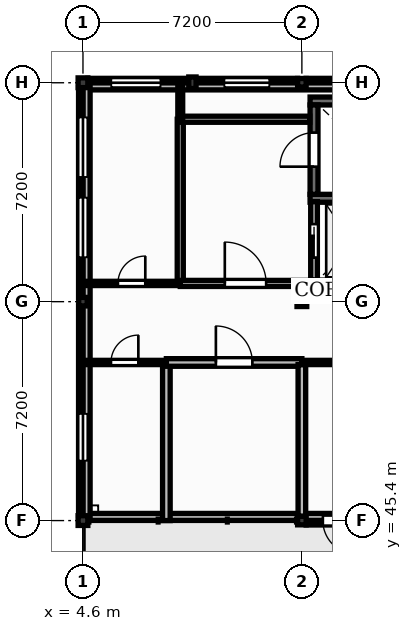
"""IFC4 building model, lengths in metres.
Left out: names, types, materials, properties, quantities, classifications, styles, units other than length and angle.
Written with IfcOpenShell. Run it as: python <this file> out.ifc"""

import sys

from ifc_helpers import new_model, si_unit, direction, frame, frame_2d, origin, origin_2d, place, context, subcontext, project, spatial, polyline, rectangle, outline, extrude, element, fill, save


model = new_model("IFC4")
c1 = context("Model", 3, precision=1e-05, world=origin(), true_north=direction((0.0, 1.0)))
c2 = subcontext(c1, "Body", "Model", "MODEL_VIEW")
j1 = project(units=[si_unit("LENGTHUNIT", "METRE"), si_unit("PLANEANGLEUNIT", "RADIAN")], contexts=[c1])
p1 = place(None, origin())
s1 = spatial("IfcSite", under=j1, at=p1, CompositionType="ELEMENT")
p2 = place(p1, origin())
s2 = spatial("IfcBuilding", under=s1, at=p2, CompositionType="ELEMENT")
p3 = place(p2, frame((0.0, 0.0, 17.4)))
s3 = spatial("IfcBuildingStorey", under=s2, at=p3, CompositionType="ELEMENT", Elevation=17.4)
p4 = place(p3, frame((4.6, 45.4, 0.0), z_axis=(0.0, 0.0, 1.0), x_axis=(1.0, 0.0, 0.0)))
e1 = element("IfcColumn", 1, at=p4, inside=s3, PredefinedType="COLUMN", context=c2, shape_type="SweptSolid", body=[
    extrude(rectangle(XDim=0.32, YDim=0.32, at=origin_2d()), origin(), (0.0, 0.0, 1.0), 3.95),
])
p5 = place(p3, frame((4.6, 52.6, 0.0), z_axis=(0.0, 0.0, 1.0), x_axis=(1.0, 0.0, 0.0)))
e2 = element("IfcColumn", 2, at=p5, inside=s3, PredefinedType="COLUMN", context=c2, shape_type="SweptSolid", body=[
    extrude(rectangle(XDim=0.28, YDim=0.28, at=origin_2d()), origin(), (0.0, 0.0, 1.0), 3.95),
])
p6 = place(p3, frame((4.6, 59.8, 0.0), z_axis=(0.0, 0.0, 1.0), x_axis=(1.0, 0.0, 0.0)))
e3 = element("IfcColumn", 3, at=p6, inside=s3, PredefinedType="COLUMN", context=c2, shape_type="SweptSolid", body=[
    extrude(rectangle(XDim=0.32, YDim=0.32, at=origin_2d()), origin(), (0.0, 0.0, 1.0), 3.95),
])
p7 = place(p3, frame((11.8, 45.4, 0.0), z_axis=(0.0, 0.0, 1.0), x_axis=(1.0, 0.0, 0.0)))
e4 = element("IfcColumn", 4, at=p7, inside=s3, PredefinedType="COLUMN", context=c2, shape_type="SweptSolid", body=[
    extrude(rectangle(XDim=0.28, YDim=0.28, at=origin_2d()), origin(), (0.0, 0.0, 1.0), 3.95),
])
p8 = place(p3, frame((11.8, 52.6, 0.0), z_axis=(0.0, 0.0, 1.0), x_axis=(1.0, 0.0, 0.0)))
e5 = element("IfcColumn", 5, at=p8, inside=s3, PredefinedType="COLUMN", context=c2, shape_type="SweptSolid", body=[
    extrude(rectangle(XDim=0.32, YDim=0.32, at=origin_2d()), origin(), (0.0, 0.0, 1.0), 3.95),
])
p9 = place(p3, frame((11.8, 59.8, 0.0), z_axis=(0.0, 0.0, 1.0), x_axis=(1.0, 0.0, 0.0)))
e6 = element("IfcColumn", 6, at=p9, inside=s3, PredefinedType="COLUMN", context=c2, shape_type="SweptSolid", body=[
    extrude(rectangle(XDim=0.28, YDim=0.28, at=origin_2d()), origin(), (0.0, 0.0, 1.0), 3.95),
])
p10 = place(p3, frame((8.2, 59.8, 0.0), z_axis=(0.0, 0.0, 1.0), x_axis=(1.0, 0.0, 0.0)))
e7 = element("IfcColumn", 7, at=p10, inside=s3, PredefinedType="PILASTER", context=c2, shape_type="SweptSolid", body=[
    extrude(rectangle(XDim=0.24, YDim=0.38, at=origin_2d()), origin(), (0.0, 0.0, 1.0), 3.95),
])
p11 = place(p3, frame((4.6, 45.56, 0.0), z_axis=(0.0, 0.0, 1.0), x_axis=(0.0, 1.0, 0.0)))
e8 = element("IfcWall", 8, at=p11, inside=s3, PredefinedType="SOLIDWALL", context=c2, shape_type="SweptSolid", body=[
    extrude(rectangle(XDim=6.9, YDim=0.29, at=frame_2d((3.45, 0.0))), origin(), (0.0, 0.0, 1.0), 3.49),
])
p12 = place(p11, frame((1.81, 0.0, 1.05)))
e9 = element("IfcOpeningElement", 9, at=p12, cuts=e8, PredefinedType="OPENING", context=c2, shape_type="SweptSolid", body=[
    extrude(rectangle(XDim=1.54, YDim=1.65, at=frame_2d((0.77, 0.825))), frame((0.0, 0.155, 0.0), z_axis=(0.0, -1.0, 0.0), x_axis=(1.0, 0.0, 0.0)), (0.0, 0.0, 1.0), 0.31),
])
p13 = place(p3, frame((4.76, 59.8, 0.0), z_axis=(0.0, 0.0, 1.0), x_axis=(1.0, 0.0, 0.0)))
e10 = element("IfcWall", 10, at=p13, inside=s3, PredefinedType="SOLIDWALL", context=c2, shape_type="SweptSolid", body=[
    extrude(rectangle(XDim=3.32, YDim=0.29, at=frame_2d((1.66, 0.0))), origin(), (0.0, 0.0, 1.0), 3.49),
])
p14 = place(p13, frame((0.77, 0.0, 1.0)))
e11 = element("IfcOpeningElement", 11, at=p14, cuts=e10, PredefinedType="OPENING", context=c2, shape_type="SweptSolid", body=[
    extrude(rectangle(XDim=1.62, YDim=1.95, at=frame_2d((0.81, 0.975))), frame((0.0, 0.155, 0.0), z_axis=(0.0, -1.0, 0.0), x_axis=(1.0, 0.0, 0.0)), (0.0, 0.0, 1.0), 0.31),
])
p15 = place(p3, frame((8.32, 59.8, 0.0), z_axis=(0.0, 0.0, 1.0), x_axis=(1.0, 0.0, 0.0)))
e12 = element("IfcWall", 12, at=p15, inside=s3, PredefinedType="SOLIDWALL", context=c2, shape_type="SweptSolid", body=[
    extrude(rectangle(XDim=3.34, YDim=0.29, at=frame_2d((1.67, 0.0))), origin(), (0.0, 0.0, 1.0), 3.49),
])
p16 = place(p15, frame((0.93, 0.0, 1.0)))
e13 = element("IfcOpeningElement", 13, at=p16, cuts=e12, PredefinedType="OPENING", context=c2, shape_type="SweptSolid", body=[
    extrude(rectangle(XDim=1.48, YDim=1.95, at=frame_2d((0.74, 0.975))), frame((0.0, 0.155, 0.0), z_axis=(0.0, -1.0, 0.0), x_axis=(1.0, 0.0, 0.0)), (0.0, 0.0, 1.0), 0.31),
])
p17 = place(p3, frame((4.6, 52.74, 0.0), z_axis=(0.0, 0.0, 1.0), x_axis=(0.0, 1.0, 0.0)))
e14 = element("IfcWall", 14, at=p17, inside=s3, PredefinedType="SOLIDWALL", context=c2, shape_type="SweptSolid", body=[
    extrude(rectangle(XDim=6.9, YDim=0.29, at=frame_2d((3.45, 0.0))), origin(), (0.0, 0.0, 1.0), 3.49),
])
p18 = place(p17, frame((1.32, 0.0, 1.05)))
e15 = element("IfcOpeningElement", 15, at=p18, cuts=e14, PredefinedType="OPENING", context=c2, shape_type="SweptSolid", body=[
    extrude(rectangle(XDim=1.96, YDim=1.65, at=frame_2d((0.98, 0.825))), frame((0.0, 0.155, 0.0), z_axis=(0.0, -1.0, 0.0), x_axis=(1.0, 0.0, 0.0)), (0.0, 0.0, 1.0), 0.31),
])
p19 = place(p17, frame((3.96, 0.0, 1.05)))
e16 = element("IfcOpeningElement", 16, at=p19, cuts=e14, PredefinedType="OPENING", context=c2, shape_type="SweptSolid", body=[
    extrude(rectangle(XDim=1.96, YDim=1.65, at=frame_2d((0.98, 0.825))), frame((0.0, 0.155, 0.0), z_axis=(0.0, -1.0, 0.0), x_axis=(1.0, 0.0, 0.0)), (0.0, 0.0, 1.0), 0.31),
])
p20 = place(p3, frame((11.94, 45.4, 0.0), z_axis=(0.0, 0.0, 1.0), x_axis=(1.0, 0.0, 0.0)))
e17 = element("IfcWall", 17, at=p20, inside=s3, PredefinedType="SOLIDWALL", context=c2, shape_type="SweptSolid", body=[
    extrude(rectangle(XDim=6.9, YDim=0.29, at=frame_2d((3.45, 0.0))), origin(), (0.0, 0.0, 1.0), 3.49),
])
p21 = place(p20, frame((0.55, 0.0, 0.0)))
e18 = element("IfcOpeningElement", 18, at=p21, cuts=e17, PredefinedType="OPENING", context=c2, shape_type="SweptSolid", body=[
    extrude(rectangle(XDim=1.1, YDim=2.25, at=frame_2d((0.55, 1.125))), frame((0.0, 0.155, 0.0), z_axis=(0.0, -1.0, 0.0), x_axis=(1.0, 0.0, 0.0)), (0.0, 0.0, 1.0), 0.31),
])
p22 = place(p20, frame((2.438, 0.0, 1.5)))
e19 = element("IfcOpeningElement", 19, at=p22, cuts=e17, PredefinedType="OPENING", context=c2, shape_type="SweptSolid", body=[
    extrude(rectangle(XDim=1.15, YDim=1.25, at=frame_2d((0.575, 0.625))), frame((0.0, 0.155, 0.0), z_axis=(0.0, -1.0, 0.0), x_axis=(1.0, 0.0, 0.0)), (0.0, 0.0, 1.0), 0.31),
])
p23 = place(p20, frame((4.948, 0.0, 1.0)))
e20 = element("IfcOpeningElement", 20, at=p23, cuts=e17, PredefinedType="OPENING", context=c2, shape_type="SweptSolid", body=[
    extrude(rectangle(XDim=1.2, YDim=1.95, at=frame_2d((0.6, 0.975))), frame((0.0, 0.155, 0.0), z_axis=(0.0, -1.0, 0.0), x_axis=(1.0, 0.0, 0.0)), (0.0, 0.0, 1.0), 0.31),
])
p24 = place(p3, frame((11.94, 59.8, 0.0), z_axis=(0.0, 0.0, 1.0), x_axis=(1.0, 0.0, 0.0)))
e21 = element("IfcWall", 21, at=p24, inside=s3, PredefinedType="SOLIDWALL", context=c2, shape_type="SweptSolid", body=[
    extrude(rectangle(XDim=6.9, YDim=0.29, at=frame_2d((3.45, 0.0))), origin(), (0.0, 0.0, 1.0), 3.49),
])
p25 = place(p3, frame((4.6, 59.68, 4.2), z_axis=(0.0, 0.0, 1.0), x_axis=(1.0, 0.0, 0.0)))
e22 = element("IfcWall", 22, at=p25, inside=s3, PredefinedType="PARAPET", context=c2, shape_type="SweptSolid", body=[
    extrude(outline(polyline([(0.0, 0.0), (50.4, 0.0), (50.4, 0.65), (39.312, 0.925), (39.312, 0.65), (32.256, 1.2), (32.256, 0.925), (18.144, 1.2), (18.144, 0.925), (11.088, 0.925), (11.088, 0.65), (0.0, 0.65), (0.0, 0.0)])), frame((0.0, 0.115, 0.0), z_axis=(0.0, -1.0, 0.0), x_axis=(1.0, 0.0, 0.0)), (0.0, 0.0, 1.0), 0.23),
])
p26 = place(p3, frame((4.6, 45.52, 4.2), z_axis=(0.0, 0.0, 1.0), x_axis=(1.0, 0.0, 0.0)))
e23 = element("IfcWall", 23, at=p26, inside=s3, PredefinedType="PARAPET", context=c2, shape_type="SweptSolid", body=[
    extrude(outline(polyline([(0.0, 0.0), (50.4, 0.0), (50.4, 0.6), (39.312, 0.85), (39.312, 0.6), (32.256, 1.1), (32.256, 0.85), (18.144, 1.1), (18.144, 0.85), (11.088, 0.85), (11.088, 0.6), (0.0, 0.6), (0.0, 0.0)])), frame((0.0, 0.115, 0.0), z_axis=(0.0, -1.0, 0.0), x_axis=(1.0, 0.0, 0.0)), (0.0, 0.0, 1.0), 0.23),
])
p27 = place(p3, frame((4.72, 45.52, 4.2), z_axis=(0.0, 0.0, 1.0), x_axis=(0.0, 1.0, 0.0)))
e24 = element("IfcWall", 24, at=p27, inside=s3, PredefinedType="PARAPET", context=c2, shape_type="SweptSolid", body=[
    extrude(outline(polyline([(0.0, 0.0), (14.16, 0.0), (14.16, 0.65), (11.045, 0.9), (11.045, 0.65), (9.062, 1.15), (9.062, 0.9), (5.098, 1.15), (5.098, 0.9), (3.115, 0.9), (3.115, 0.65), (0.0, 0.65), (0.0, 0.0)])), frame((0.0, 0.115, 0.0), z_axis=(0.0, -1.0, 0.0), x_axis=(1.0, 0.0, 0.0)), (0.0, 0.0, 1.0), 0.23),
])
for number, where, z_axis, x_axis in (
    (25, (12.07, 56.0, 0.0), (0.0, 0.0, 1.0), (1.0, 0.0, 0.0)),
    (26, (12.07, 59.2, 0.0), (0.0, 0.0, 1.0), (1.0, 0.0, 0.0)),
):
    element("IfcWall", number, at=place(p3, frame(where, z_axis=z_axis, x_axis=x_axis)), inside=s3, PredefinedType="SHEAR", context=c2, shape_type="SweptSolid", body=[
        extrude(rectangle(XDim=6.66, YDim=0.26, at=frame_2d((3.33, 0.0))), origin(), (0.0, 0.0, 1.0), 3.95),
    ])
p28 = place(p3, frame((12.2, 56.13, 0.0), z_axis=(0.0, 0.0, 1.0), x_axis=(0.0, 1.0, 0.0)))
e27 = element("IfcWall", 27, at=p28, inside=s3, PredefinedType="SHEAR", context=c2, shape_type="SweptSolid", body=[
    extrude(rectangle(XDim=2.94, YDim=0.26, at=frame_2d((1.47, 0.0))), origin(), (0.0, 0.0, 1.0), 3.95),
])
p29 = place(p28, frame((0.91, 0.0, 0.0)))
e28 = element("IfcOpeningElement", 28, at=p29, cuts=e27, PredefinedType="OPENING", context=c2, shape_type="SweptSolid", body=[
    extrude(rectangle(XDim=1.12, YDim=2.1, at=frame_2d((0.56, 1.05))), frame((0.0, 0.14, 0.0), z_axis=(0.0, -1.0, 0.0), x_axis=(1.0, 0.0, 0.0)), (0.0, 0.0, 1.0), 0.28),
])
p30 = place(p3, frame((12.2, 53.2, 0.0), z_axis=(0.0, 0.0, 1.0), x_axis=(1.0, 0.0, 0.0)))
e29 = element("IfcWall", 29, at=p30, inside=s3, PredefinedType="SOLIDWALL", context=c2, shape_type="SweptSolid", body=[
    extrude(rectangle(XDim=2.4, YDim=0.22, at=frame_2d((1.2, 0.0))), origin(), (0.0, 0.0, 1.0), 3.95),
])
p31 = place(p3, frame((12.2, 53.31, 0.0), z_axis=(0.0, 0.0, 1.0), x_axis=(0.0, 1.0, 0.0)))
e30 = element("IfcWall", 30, at=p31, inside=s3, PredefinedType="SOLIDWALL", context=c2, shape_type="SweptSolid", body=[
    extrude(rectangle(XDim=2.58, YDim=0.22, at=frame_2d((1.29, 0.0))), origin(), (0.0, 0.0, 1.0), 3.95),
])
p32 = place(p31, frame((0.74, 0.0, 0.0)))
e31 = element("IfcOpeningElement", 31, at=p32, cuts=e30, PredefinedType="OPENING", context=c2, shape_type="SweptSolid", body=[
    extrude(rectangle(XDim=1.1, YDim=2.15, at=frame_2d((0.55, 1.075))), frame((0.0, 0.12, 0.0), z_axis=(0.0, -1.0, 0.0), x_axis=(1.0, 0.0, 0.0)), (0.0, 0.0, 1.0), 0.24),
])
p33 = place(p3, frame((4.6, 50.6, 0.0), z_axis=(0.0, 0.0, 1.0), x_axis=(1.0, 0.0, 0.0)))
e32 = element("IfcWall", 32, at=p33, inside=s3, PredefinedType="PARTITIONING", context=c2, shape_type="SweptSolid", body=[
    extrude(rectangle(XDim=2.743, YDim=0.14, at=frame_2d((1.372, 0.0))), origin(), (0.0, 0.0, 1.0), 3.93),
])
p34 = place(p33, frame((0.921, 0.0, 0.0)))
e33 = element("IfcOpeningElement", 33, at=p34, cuts=e32, PredefinedType="OPENING", context=c2, shape_type="SweptSolid", body=[
    extrude(rectangle(XDim=0.9, YDim=2.1, at=frame_2d((0.45, 1.05))), frame((0.0, 0.08, 0.0), z_axis=(0.0, -1.0, 0.0), x_axis=(1.0, 0.0, 0.0)), (0.0, 0.0, 1.0), 0.16),
])
p35 = place(p3, frame((4.6, 53.2, 0.0), z_axis=(0.0, 0.0, 1.0), x_axis=(1.0, 0.0, 0.0)))
e34 = element("IfcWall", 34, at=p35, inside=s3, PredefinedType="PARTITIONING", context=c2, shape_type="SweptSolid", body=[
    extrude(rectangle(XDim=3.2, YDim=0.14, at=frame_2d((1.6, 0.0))), origin(), (0.0, 0.0, 1.0), 3.93),
])
p36 = place(p35, frame((1.15, 0.0, 0.0)))
e35 = element("IfcOpeningElement", 35, at=p36, cuts=e34, PredefinedType="OPENING", context=c2, shape_type="SweptSolid", body=[
    extrude(rectangle(XDim=0.9, YDim=2.1, at=frame_2d((0.45, 1.05))), frame((0.0, 0.08, 0.0), z_axis=(0.0, -1.0, 0.0), x_axis=(1.0, 0.0, 0.0)), (0.0, 0.0, 1.0), 0.16),
])
p37 = place(p3, frame((7.343, 45.4, 0.0), z_axis=(0.0, 0.0, 1.0), x_axis=(0.0, 1.0, 0.0)))
e36 = element("IfcWall", 36, at=p37, inside=s3, PredefinedType="SOLIDWALL", context=c2, shape_type="SweptSolid", body=[
    extrude(rectangle(XDim=5.13, YDim=0.25, at=frame_2d((2.565, 0.0))), origin(), (0.0, 0.0, 1.0), 3.93),
])
p38 = place(p3, frame((7.343, 50.6, 0.0), z_axis=(0.0, 0.0, 1.0), x_axis=(1.0, 0.0, 0.0)))
e37 = element("IfcWall", 37, at=p38, inside=s3, PredefinedType="SOLIDWALL", context=c2, shape_type="SweptSolid", body=[
    extrude(rectangle(XDim=4.457, YDim=0.25, at=frame_2d((2.229, 0.0))), origin(), (0.0, 0.0, 1.0), 3.93),
])
p39 = place(p38, frame((1.628, 0.0, 0.0)))
e38 = element("IfcOpeningElement", 38, at=p39, cuts=e37, PredefinedType="OPENING", context=c2, shape_type="SweptSolid", body=[
    extrude(rectangle(XDim=1.2, YDim=2.15, at=frame_2d((0.6, 1.075))), frame((0.0, 0.135, 0.0), z_axis=(0.0, -1.0, 0.0), x_axis=(1.0, 0.0, 0.0)), (0.0, 0.0, 1.0), 0.27),
])
p40 = place(p3, frame((7.8, 53.27, 0.0), z_axis=(0.0, 0.0, 1.0), x_axis=(0.0, 1.0, 0.0)))
e39 = element("IfcWall", 39, at=p40, inside=s3, PredefinedType="PARTITIONING", context=c2, shape_type="SweptSolid", body=[
    extrude(rectangle(XDim=5.33, YDim=0.2, at=frame_2d((2.665, 0.0))), origin(), (0.0, 0.0, 1.0), 3.93),
])
p41 = place(p3, frame((7.8, 53.2, 0.0), z_axis=(0.0, 0.0, 1.0), x_axis=(1.0, 0.0, 0.0)))
e40 = element("IfcWall", 40, at=p41, inside=s3, PredefinedType="PARTITIONING", context=c2, shape_type="SweptSolid", body=[
    extrude(rectangle(XDim=4.29, YDim=0.2, at=frame_2d((2.145, 0.0))), origin(), (0.0, 0.0, 1.0), 3.93),
])
p42 = place(p41, frame((1.465, 0.0, 0.0)))
e41 = element("IfcOpeningElement", 41, at=p42, cuts=e40, PredefinedType="OPENING", context=c2, shape_type="SweptSolid", body=[
    extrude(rectangle(XDim=1.36, YDim=2.2, at=frame_2d((0.68, 1.1))), frame((0.0, 0.11, 0.0), z_axis=(0.0, -1.0, 0.0), x_axis=(1.0, 0.0, 0.0)), (0.0, 0.0, 1.0), 0.22),
])
p43 = place(p3, frame((11.8, 45.54, 0.0), z_axis=(0.0, 0.0, 1.0), x_axis=(0.0, 1.0, 0.0)))
e42 = element("IfcWall", 42, at=p43, inside=s3, PredefinedType="SOLIDWALL", context=c2, shape_type="SweptSolid", body=[
    extrude(rectangle(XDim=4.99, YDim=0.25, at=frame_2d((2.495, 0.0))), origin(), (0.0, 0.0, 1.0), 3.49),
])
p44 = place(p3, frame((11.8, 50.6, 0.0), z_axis=(0.0, 0.0, 1.0), x_axis=(1.0, 0.0, 0.0)))
e43 = element("IfcWall", 43, at=p44, inside=s3, PredefinedType="PARTITIONING", context=c2, shape_type="SweptSolid", body=[
    extrude(rectangle(XDim=4.457, YDim=0.14, at=frame_2d((2.229, 0.0))), origin(), (0.0, 0.0, 1.0), 3.93),
])
p45 = place(p44, frame((1.678, 0.0, 0.0)))
e44 = element("IfcOpeningElement", 44, at=p45, cuts=e43, PredefinedType="OPENING", context=c2, shape_type="SweptSolid", body=[
    extrude(rectangle(XDim=1.1, YDim=2.1, at=frame_2d((0.55, 1.05))), frame((0.0, 0.08, 0.0), z_axis=(0.0, -1.0, 0.0), x_axis=(1.0, 0.0, 0.0)), (0.0, 0.0, 1.0), 0.16),
])
p46 = place(p3, frame((12.06, 58.6, 0.0), z_axis=(0.0, 0.0, 1.0), x_axis=(-1.0, 0.0, 0.0)))
e45 = element("IfcWall", 45, at=p46, inside=s3, PredefinedType="PARTITIONING", context=c2, shape_type="SweptSolid", body=[
    extrude(rectangle(XDim=4.26, YDim=0.2, at=frame_2d((2.13, 0.0))), origin(), (0.0, 0.0, 1.0), 3.93),
])
p47 = place(p3, frame((7.8, 58.6, 0.0), z_axis=(0.0, 0.0, 1.0), x_axis=(0.0, 1.0, 0.0)))
e46 = element("IfcWall", 46, at=p47, inside=s3, PredefinedType="PARTITIONING", context=c2, shape_type="SweptSolid", body=[
    extrude(rectangle(XDim=1.2, YDim=0.16, at=frame_2d((0.6, 0.0))), origin(), (0.0, 0.0, 1.0), 3.93),
])
p48 = place(p12, origin())
e47 = element("IfcWindow", 47, at=p48, inside=s3, PartitioningType="DOUBLE_PANEL_VERTICAL", PredefinedType="WINDOW", context=c2, shape_type="SweptSolid", body=[
    extrude(rectangle(XDim=1.54, YDim=1.65, at=frame_2d((0.77, 0.825))), frame((0.0, 0.03, 0.0), z_axis=(0.0, -1.0, 0.0), x_axis=(1.0, 0.0, 0.0)), (0.0, 0.0, 1.0), 0.06),
])
fill(e9, e47)
p49 = place(p14, origin())
e48 = element("IfcWindow", 48, at=p49, inside=s3, PartitioningType="DOUBLE_PANEL_VERTICAL", PredefinedType="WINDOW", context=c2, shape_type="SweptSolid", body=[
    extrude(rectangle(XDim=1.62, YDim=1.95, at=frame_2d((0.81, 0.975))), frame((0.0, 0.03, 0.0), z_axis=(0.0, -1.0, 0.0), x_axis=(1.0, 0.0, 0.0)), (0.0, 0.0, 1.0), 0.06),
])
fill(e11, e48)
p50 = place(p16, origin())
e49 = element("IfcWindow", 49, at=p50, inside=s3, PartitioningType="SINGLE_PANEL", PredefinedType="WINDOW", context=c2, shape_type="SweptSolid", body=[
    extrude(rectangle(XDim=1.48, YDim=1.95, at=frame_2d((0.74, 0.975))), frame((0.0, 0.03, 0.0), z_axis=(0.0, -1.0, 0.0), x_axis=(1.0, 0.0, 0.0)), (0.0, 0.0, 1.0), 0.06),
])
fill(e13, e49)
p51 = place(p18, origin())
e50 = element("IfcWindow", 50, at=p51, inside=s3, PartitioningType="DOUBLE_PANEL_VERTICAL", PredefinedType="WINDOW", context=c2, shape_type="SweptSolid", body=[
    extrude(rectangle(XDim=1.96, YDim=1.65, at=frame_2d((0.98, 0.825))), frame((0.0, 0.03, 0.0), z_axis=(0.0, -1.0, 0.0), x_axis=(1.0, 0.0, 0.0)), (0.0, 0.0, 1.0), 0.06),
])
fill(e15, e50)
p52 = place(p19, origin())
e51 = element("IfcWindow", 51, at=p52, inside=s3, PartitioningType="DOUBLE_PANEL_VERTICAL", PredefinedType="WINDOW", context=c2, shape_type="SweptSolid", body=[
    extrude(rectangle(XDim=1.96, YDim=1.65, at=frame_2d((0.98, 0.825))), frame((0.0, 0.03, 0.0), z_axis=(0.0, -1.0, 0.0), x_axis=(1.0, 0.0, 0.0)), (0.0, 0.0, 1.0), 0.06),
])
fill(e16, e51)
p53 = place(p21, frame((1.1, 0.0, 0.0), z_axis=(0.0, 0.0, 1.0), x_axis=(-1.0, 0.0, 0.0)))
e52 = element("IfcDoor", 52, at=p53, inside=s3, OperationType="SINGLE_SWING_LEFT", PredefinedType="DOOR", context=c2, shape_type="SweptSolid", body=[
    extrude(rectangle(XDim=1.1, YDim=2.25, at=frame_2d((0.55, 1.125))), frame((0.0, 0.025, 0.0), z_axis=(0.0, -1.0, 0.0), x_axis=(1.0, 0.0, 0.0)), (0.0, 0.0, 1.0), 0.05),
])
fill(e18, e52)
p54 = place(p32, origin())
e53 = element("IfcDoor", 53, at=p54, inside=s3, OperationType="SLIDING_TO_LEFT", PredefinedType="DOOR", context=c2, shape_type="SweptSolid", body=[
    extrude(rectangle(XDim=1.1, YDim=2.15, at=frame_2d((0.55, 1.075))), frame((0.0, 0.025, 0.0), z_axis=(0.0, -1.0, 0.0), x_axis=(1.0, 0.0, 0.0)), (0.0, 0.0, 1.0), 0.05),
])
fill(e31, e53)
p55 = place(p29, origin())
e54 = element("IfcDoor", 54, at=p55, inside=s3, OperationType="SINGLE_SWING_LEFT", PredefinedType="DOOR", context=c2, shape_type="SweptSolid", body=[
    extrude(rectangle(XDim=1.12, YDim=2.1, at=frame_2d((0.56, 1.05))), frame((0.0, 0.025, 0.0), z_axis=(0.0, -1.0, 0.0), x_axis=(1.0, 0.0, 0.0)), (0.0, 0.0, 1.0), 0.05),
])
fill(e28, e54)
p56 = place(p42, origin())
e55 = element("IfcDoor", 55, at=p56, inside=s3, OperationType="SINGLE_SWING_LEFT", PredefinedType="DOOR", context=c2, shape_type="SweptSolid", body=[
    extrude(rectangle(XDim=1.36, YDim=2.2, at=frame_2d((0.68, 1.1))), frame((0.0, 0.025, 0.0), z_axis=(0.0, -1.0, 0.0), x_axis=(1.0, 0.0, 0.0)), (0.0, 0.0, 1.0), 0.05),
])
fill(e41, e55)
p57 = place(p34, origin())
e56 = element("IfcDoor", 56, at=p57, inside=s3, OperationType="SINGLE_SWING_RIGHT", PredefinedType="DOOR", context=c2, shape_type="SweptSolid", body=[
    extrude(rectangle(XDim=0.9, YDim=2.1, at=frame_2d((0.45, 1.05))), frame((0.0, 0.025, 0.0), z_axis=(0.0, -1.0, 0.0), x_axis=(1.0, 0.0, 0.0)), (0.0, 0.0, 1.0), 0.05),
])
fill(e33, e56)
p58 = place(p39, origin())
e57 = element("IfcDoor", 57, at=p58, inside=s3, OperationType="SINGLE_SWING_LEFT", PredefinedType="DOOR", context=c2, shape_type="SweptSolid", body=[
    extrude(rectangle(XDim=1.2, YDim=2.15, at=frame_2d((0.6, 1.075))), frame((0.0, 0.025, 0.0), z_axis=(0.0, -1.0, 0.0), x_axis=(1.0, 0.0, 0.0)), (0.0, 0.0, 1.0), 0.05),
])
fill(e38, e57)
p59 = place(p36, origin())
e58 = element("IfcDoor", 58, at=p59, inside=s3, OperationType="SINGLE_SWING_RIGHT", PredefinedType="DOOR", context=c2, shape_type="SweptSolid", body=[
    extrude(rectangle(XDim=0.9, YDim=2.1, at=frame_2d((0.45, 1.05))), frame((0.0, 0.025, 0.0), z_axis=(0.0, -1.0, 0.0), x_axis=(1.0, 0.0, 0.0)), (0.0, 0.0, 1.0), 0.05),
])
fill(e35, e58)
save(model, sys.argv[1])
